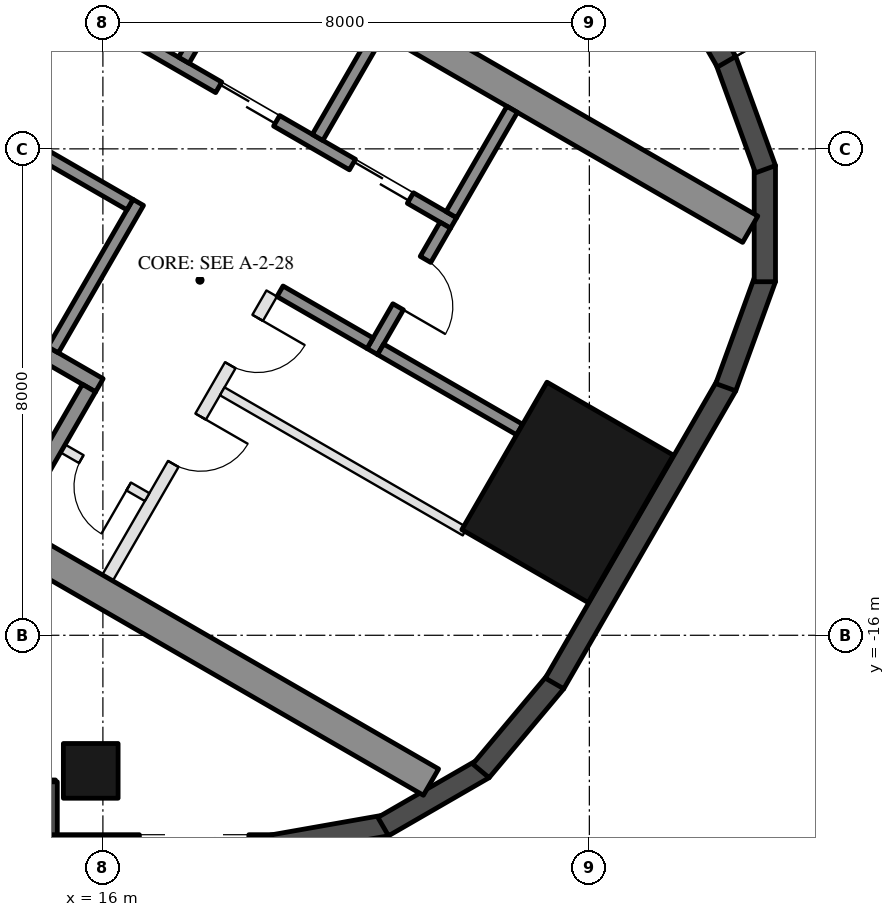
"""IFC4 building model, lengths in metres.
Left out: names, types, materials, properties, quantities, classifications, styles, units other than length and angle.
Written with IfcOpenShell. Run it as: python <this file> out.ifc"""

import sys

from ifc_helpers import new_model, si_unit, direction, frame, frame_2d, origin, origin_2d, place, context, subcontext, project, spatial, rectangle, hollow_rectangle, extrude, element, fill, save


model = new_model("IFC4")
c1 = context("Model", 3, precision=1e-05, world=origin(), true_north=direction((0.0, 1.0)))
c2 = subcontext(c1, "Body", "Model", "MODEL_VIEW")
j1 = project(units=[si_unit("LENGTHUNIT", "METRE"), si_unit("PLANEANGLEUNIT", "RADIAN")], contexts=[c1])
p1 = place(None, origin())
s1 = spatial("IfcSite", under=j1, at=p1, CompositionType="ELEMENT")
p2 = place(p1, origin())
s2 = spatial("IfcBuilding", under=s1, at=p2, CompositionType="ELEMENT")
p3 = place(p2, frame((0.0, 0.0, 124.2)))
s3 = spatial("IfcBuildingStorey", under=s2, at=p3, CompositionType="ELEMENT", Elevation=124.2)
p4 = place(p3, frame((15.8, -18.23, 0.0), z_axis=(0.0, 0.0, 1.0), x_axis=(-1.0, 0.0, 0.0)))
e1 = element("IfcColumn", 1, at=p4, inside=s3, PredefinedType="COLUMN", context=c2, shape_type="SweptSolid", body=[
    extrude(hollow_rectangle(XDim=0.9, YDim=0.9, WallThickness=0.04, at=origin_2d()), origin(), (0.0, 0.0, 1.0), 3.7),
])
p5 = place(p3, frame((23.643, -13.65, 0.0), z_axis=(0.0, 0.0, 1.0), x_axis=(0.5, 0.866025403784, 0.0)))
e2 = element("IfcColumn", 2, at=p5, inside=s3, PredefinedType="COLUMN", context=c2, shape_type="SweptSolid", body=[
    extrude(hollow_rectangle(XDim=2.8, YDim=2.4, WallThickness=0.07, at=origin_2d()), origin(), (0.0, 0.0, 1.0), 3.7),
])
p6 = place(p3, frame((8.48, -18.555, 0.0), z_axis=(0.0, 0.0, 1.0), x_axis=(1.0, 0.0, 0.0)))
e3 = element("IfcWall", 3, at=p6, inside=s3, PredefinedType="SOLIDWALL", context=c2, shape_type="SweptSolid", body=[
    extrude(rectangle(XDim=6.74, YDim=0.35, at=frame_2d((3.37, 0.0))), origin(), (0.0, 0.0, 1.0), 3.55),
])
p7 = place(p6, frame((0.32, 0.0, 0.0)))
e4 = element("IfcOpeningElement", 4, at=p7, cuts=e3, PredefinedType="OPENING", context=c2, shape_type="SweptSolid", body=[
    extrude(rectangle(XDim=2.4, YDim=2.4, at=frame_2d((1.2, 1.2))), frame((0.0, 0.185, 0.0), z_axis=(0.0, -1.0, 0.0), x_axis=(1.0, 0.0, 0.0)), (0.0, 0.0, 1.0), 0.37),
])
p8 = place(p6, frame((3.02, 0.0, 0.3)))
e5 = element("IfcOpeningElement", 5, at=p8, cuts=e3, PredefinedType="OPENING", context=c2, shape_type="SweptSolid", body=[
    extrude(rectangle(XDim=2.9, YDim=2.65, at=frame_2d((1.45, 1.325))), frame((0.0, 0.185, 0.0), z_axis=(0.0, -1.0, 0.0), x_axis=(1.0, 0.0, 0.0)), (0.0, 0.0, 1.0), 0.37),
])
p9 = place(p3, frame((15.075, -18.41, 0.0), z_axis=(0.0, 0.0, 1.0), x_axis=(0.0, -1.0, 0.0)))
e6 = element("IfcWall", 6, at=p9, inside=s3, PredefinedType="SOLIDWALL", context=c2, shape_type="SweptSolid", body=[
    extrude(rectangle(XDim=1.22, YDim=0.35, at=frame_2d((0.61, 0.0))), origin(), (0.0, 0.0, 1.0), 3.55),
])
p10 = place(p3, frame((14.9, -19.455, 0.0), z_axis=(0.0, 0.0, 1.0), x_axis=(1.0, 0.0, 0.0)))
e7 = element("IfcWall", 7, at=p10, inside=s3, PredefinedType="SOLIDWALL", context=c2, shape_type="SweptSolid", body=[
    extrude(rectangle(XDim=3.916, YDim=0.35, at=frame_2d((1.958, 0.0))), origin(), (0.0, 0.0, 1.0), 3.55),
])
p11 = place(p10, frame((1.7, 0.0, 0.3)))
e8 = element("IfcOpeningElement", 8, at=p11, cuts=e7, PredefinedType="OPENING", context=c2, shape_type="SweptSolid", body=[
    extrude(rectangle(XDim=1.8, YDim=2.65, at=frame_2d((0.9, 1.325))), frame((0.0, 0.185, 0.0), z_axis=(0.0, -1.0, 0.0), x_axis=(1.0, 0.0, 0.0)), (0.0, 0.0, 1.0), 0.37),
])
p12 = place(p3, frame((18.785, -19.458, 0.0), z_axis=(0.0, 0.0, 1.0), x_axis=(0.984798995425, 0.173697837091, 0.0)))
e9 = element("IfcWall", 9, at=p12, inside=s3, PredefinedType="SOLIDWALL", context=c2, shape_type="SweptSolid", body=[
    extrude(rectangle(XDim=1.91, YDim=0.35, at=frame_2d((0.955, 0.0))), origin(), (0.0, 0.0, 1.0), 3.55),
])
for number, where, z_axis, x_axis in (
    (10, (20.61, -19.147, 0.0), (0.0, 0.0, 1.0), (0.866, 0.5, 0.0)),
    (11, (22.217, -18.231, 0.0), (0.0, 0.0, 1.0), (0.643, 0.766, 0.0)),
):
    element("IfcWall", number, at=place(p3, frame(where, z_axis=z_axis, x_axis=x_axis)), inside=s3, PredefinedType="SOLIDWALL", context=c2, shape_type="SweptSolid", body=[
        extrude(rectangle(XDim=1.91, YDim=0.35, at=frame_2d((0.955, 0.0))), origin(), (0.0, 0.0, 1.0), 3.55),
    ])
p13 = place(p3, frame((23.427, -16.792, 0.0), z_axis=(0.0, 0.0, 1.0), x_axis=(0.500018773155, 0.866014564827, 0.0)))
e12 = element("IfcWall", 12, at=p13, inside=s3, PredefinedType="SOLIDWALL", context=c2, shape_type="SweptSolid", body=[
    extrude(rectangle(XDim=5.658, YDim=0.35, at=frame_2d((2.829, 0.0))), origin(), (0.0, 0.0, 1.0), 3.55),
])
for number, where, z_axis, x_axis in (
    (13, (26.244, -11.92, 0.0), (0.0, 0.0, 1.0), (0.342, 0.94, 0.0)),
    (14, (26.886, -10.185, 0.0), (0.0, 0.0, 1.0), (0.0, 1.0, 0.0)),
    (15, (26.897, -8.335, 0.0), (0.0, 0.0, 1.0), (-0.342, 0.94, 0.0)),
):
    element("IfcWall", number, at=place(p3, frame(where, z_axis=z_axis, x_axis=x_axis)), inside=s3, PredefinedType="SOLIDWALL", context=c2, shape_type="SweptSolid", body=[
        extrude(rectangle(XDim=1.91, YDim=0.35, at=frame_2d((0.955, 0.0))), origin(), (0.0, 0.0, 1.0), 3.55),
    ])
p14 = place(p3, frame((26.257, -6.567, 0.0), z_axis=(0.0, 0.0, 1.0), x_axis=(-0.500023526245, 0.866011820475, 0.0)))
e16 = element("IfcWall", 16, at=p14, inside=s3, PredefinedType="SOLIDWALL", context=c2, shape_type="SweptSolid", body=[
    extrude(rectangle(XDim=11.816, YDim=0.35, at=frame_2d((5.908, 0.0))), origin(), (0.0, 0.0, 1.0), 3.55),
])
p15 = place(p14, frame((0.38, 0.0, 0.3)))
e17 = element("IfcOpeningElement", 17, at=p15, cuts=e16, PredefinedType="OPENING", context=c2, shape_type="SweptSolid", body=[
    extrude(rectangle(XDim=1.8, YDim=2.65, at=frame_2d((0.9, 1.325))), frame((0.0, 0.185, 0.0), z_axis=(0.0, -1.0, 0.0), x_axis=(1.0, 0.0, 0.0)), (0.0, 0.0, 1.0), 0.37),
])
p16 = place(p14, frame((7.716, 0.0, 0.0)))
e18 = element("IfcOpeningElement", 18, at=p16, cuts=e16, PredefinedType="OPENING", context=c2, shape_type="SweptSolid", body=[
    extrude(rectangle(XDim=2.4, YDim=2.4, at=frame_2d((1.2, 1.2))), frame((0.0, 0.185, 0.0), z_axis=(0.0, -1.0, 0.0), x_axis=(1.0, 0.0, 0.0)), (0.0, 0.0, 1.0), 0.37),
])
p17 = place(p14, frame((3.816, 0.0, 0.3)))
e19 = element("IfcOpeningElement", 19, at=p17, cuts=e16, PredefinedType="OPENING", context=c2, shape_type="SweptSolid", body=[
    extrude(rectangle(XDim=1.6, YDim=2.65, at=frame_2d((0.8, 1.325))), frame((0.0, 0.185, 0.0), z_axis=(0.0, -1.0, 0.0), x_axis=(1.0, 0.0, 0.0)), (0.0, 0.0, 1.0), 0.37),
])
p18 = place(p14, frame((5.716, 0.0, 0.3)))
e20 = element("IfcOpeningElement", 20, at=p18, cuts=e16, PredefinedType="OPENING", context=c2, shape_type="SweptSolid", body=[
    extrude(rectangle(XDim=1.6, YDim=2.65, at=frame_2d((0.8, 1.325))), frame((0.0, 0.185, 0.0), z_axis=(0.0, -1.0, 0.0), x_axis=(1.0, 0.0, 0.0)), (0.0, 0.0, 1.0), 0.37),
])
for number, where, z_axis, x_axis in (
    (21, (8.547, -10.997, 0.0), (0.0, 0.0, 1.0), (0.866, -0.5, 0.0)),
    (22, (13.797, -1.903, 0.0), (0.0, 0.0, 1.0), (0.866, -0.5, 0.0)),
):
    element("IfcWall", number, at=place(p3, frame(where, z_axis=z_axis, x_axis=x_axis)), inside=s3, PredefinedType="SHEAR", context=c2, shape_type="SweptSolid", body=[
        extrude(rectangle(XDim=14.837, YDim=0.5, at=frame_2d((7.418, 0.0))), origin(), (0.0, 0.0, 1.0), 3.5),
    ])
p19 = place(p3, frame((10.356, -8.664, 0.0), z_axis=(0.0, 0.0, 1.0), x_axis=(0.866028629588, -0.499994412703, 0.0)))
e23 = element("IfcWall", 23, at=p19, inside=s3, PredefinedType="SHEAR", context=c2, shape_type="SweptSolid", body=[
    extrude(rectangle(XDim=6.45, YDim=0.25, at=frame_2d((3.225, 0.0))), origin(), (0.0, 0.0, 1.0), 3.5),
])
p20 = place(p19, frame((0.3, 0.0, 0.0)))
e24 = element("IfcOpeningElement", 24, at=p20, cuts=e23, PredefinedType="OPENING", context=c2, shape_type="SweptSolid", body=[
    extrude(rectangle(XDim=1.0, YDim=2.1, at=frame_2d((0.5, 1.05))), frame((0.0, 0.135, 0.0), z_axis=(0.0, -1.0, 0.0), x_axis=(1.0, 0.0, 0.0)), (0.0, 0.0, 1.0), 0.27),
])
p21 = place(p3, frame((14.496, -14.143, 0.0), z_axis=(0.0, 0.0, 1.0), x_axis=(0.500062241894, 0.865989465428, 0.0)))
e25 = element("IfcWall", 25, at=p21, inside=s3, PredefinedType="SHEAR", context=c2, shape_type="SweptSolid", body=[
    extrude(rectangle(XDim=2.55, YDim=0.25, at=frame_2d((1.275, 0.0))), origin(), (0.0, 0.0, 1.0), 3.5),
])
p22 = place(p3, frame((15.181, -11.305, 0.0), z_axis=(0.0, 0.0, 1.0), x_axis=(0.49994636267, 0.866056369097, 0.0)))
e26 = element("IfcWall", 26, at=p22, inside=s3, PredefinedType="SHEAR", context=c2, shape_type="SweptSolid", body=[
    extrude(rectangle(XDim=2.8, YDim=0.2, at=frame_2d((1.4, 0.0))), origin(), (0.0, 0.0, 1.0), 3.5),
])
p23 = place(p3, frame((14.02, -7.517, 0.0), z_axis=(0.0, 0.0, 1.0), x_axis=(0.866034573852, -0.49998411664, 0.0)))
e27 = element("IfcWall", 27, at=p23, inside=s3, PredefinedType="SHEAR", context=c2, shape_type="SweptSolid", body=[
    extrude(rectangle(XDim=2.8, YDim=0.2, at=frame_2d((1.4, 0.0))), origin(), (0.0, 0.0, 1.0), 3.5),
])
p24 = place(p3, frame((12.968, -4.138, 0.0), z_axis=(0.0, 0.0, 1.0), x_axis=(0.866028328073, -0.49999493495, 0.0)))
e28 = element("IfcWall", 28, at=p24, inside=s3, PredefinedType="SHEAR", context=c2, shape_type="SweptSolid", body=[
    extrude(rectangle(XDim=10.16, YDim=0.2, at=frame_2d((5.08, 0.0))), origin(), (0.0, 0.0, 1.0), 3.5),
])
p25 = place(p24, frame((0.62, 0.0, 0.0)))
e29 = element("IfcOpeningElement", 29, at=p25, cuts=e28, PredefinedType="OPENING", context=c2, shape_type="SweptSolid", body=[
    extrude(rectangle(XDim=1.1, YDim=2.1, at=frame_2d((0.55, 1.05))), frame((0.0, 0.11, 0.0), z_axis=(0.0, -1.0, 0.0), x_axis=(1.0, 0.0, 0.0)), (0.0, 0.0, 1.0), 0.22),
])
p26 = place(p24, frame((3.16, 0.0, 0.0)))
e30 = element("IfcOpeningElement", 30, at=p26, cuts=e28, PredefinedType="OPENING", context=c2, shape_type="SweptSolid", body=[
    extrude(rectangle(XDim=1.1, YDim=2.1, at=frame_2d((0.55, 1.05))), frame((0.0, 0.11, 0.0), z_axis=(0.0, -1.0, 0.0), x_axis=(1.0, 0.0, 0.0)), (0.0, 0.0, 1.0), 0.22),
])
p27 = place(p24, frame((5.7, 0.0, 0.0)))
e31 = element("IfcOpeningElement", 31, at=p27, cuts=e28, PredefinedType="OPENING", context=c2, shape_type="SweptSolid", body=[
    extrude(rectangle(XDim=1.1, YDim=2.1, at=frame_2d((0.55, 1.05))), frame((0.0, 0.11, 0.0), z_axis=(0.0, -1.0, 0.0), x_axis=(1.0, 0.0, 0.0)), (0.0, 0.0, 1.0), 0.22),
])
p28 = place(p24, frame((8.24, 0.0, 0.0)))
e32 = element("IfcOpeningElement", 32, at=p28, cuts=e28, PredefinedType="OPENING", context=c2, shape_type="SweptSolid", body=[
    extrude(rectangle(XDim=1.1, YDim=2.1, at=frame_2d((0.55, 1.05))), frame((0.0, 0.11, 0.0), z_axis=(0.0, -1.0, 0.0), x_axis=(1.0, 0.0, 0.0)), (0.0, 0.0, 1.0), 0.22),
])
p29 = place(p3, frame((20.43, -11.333, 0.0), z_axis=(0.0, 0.0, 1.0), x_axis=(0.500001309137, 0.866024647952, 0.0)))
e33 = element("IfcWall", 33, at=p29, inside=s3, PredefinedType="SHEAR", context=c2, shape_type="SweptSolid", body=[
    extrude(rectangle(XDim=2.4, YDim=0.2, at=frame_2d((1.2, 0.0))), origin(), (0.0, 0.0, 1.0), 3.5),
])
p30 = place(p29, frame((0.85, 0.0, 0.0)))
e34 = element("IfcOpeningElement", 34, at=p30, cuts=e33, PredefinedType="OPENING", context=c2, shape_type="SweptSolid", body=[
    extrude(rectangle(XDim=0.9, YDim=2.1, at=frame_2d((0.45, 1.05))), frame((0.0, 0.11, 0.0), z_axis=(0.0, -1.0, 0.0), x_axis=(1.0, 0.0, 0.0)), (0.0, 0.0, 1.0), 0.22),
])
p31 = place(p3, frame((18.913, -10.342, 0.0), z_axis=(0.0, 0.0, 1.0), x_axis=(0.866038183914, -0.499977863513, 0.0)))
e35 = element("IfcWall", 35, at=p31, inside=s3, PredefinedType="SHEAR", context=c2, shape_type="SweptSolid", body=[
    extrude(rectangle(XDim=1.71, YDim=0.2, at=frame_2d((0.855, 0.0))), origin(), (0.0, 0.0, 1.0), 3.5),
])
for number, where, z_axis, x_axis in (
    (36, (17.331, -6.542, 0.0), (0.0, 0.0, 1.0), (0.5, 0.866, 0.0)),
    (37, (19.531, -7.812, 0.0), (0.0, 0.0, 1.0), (0.5, 0.866, 0.0)),
    (38, (21.73, -9.082, 0.0), (0.0, 0.0, 1.0), (0.5, 0.866, 0.0)),
):
    element("IfcWall", number, at=place(p3, frame(where, z_axis=z_axis, x_axis=x_axis)), inside=s3, PredefinedType="SHEAR", context=c2, shape_type="SweptSolid", body=[
        extrude(rectangle(XDim=2.0, YDim=0.2, at=frame_2d((1.0, 0.0))), origin(), (0.0, 0.0, 1.0), 3.5),
    ])
p32 = place(p3, frame((20.567, -11.297, 0.0), z_axis=(0.0, 0.0, 1.0), x_axis=(0.866060851709, -0.499938597367, 0.0)))
e39 = element("IfcWall", 39, at=p32, inside=s3, PredefinedType="SHEAR", context=c2, shape_type="SweptSolid", body=[
    extrude(rectangle(XDim=2.64, YDim=0.2, at=frame_2d((1.32, 0.0))), origin(), (0.0, 0.0, 1.0), 3.5),
])
p33 = place(p3, frame((16.076, -15.055, 0.0), z_axis=(0.0, 0.0, 1.0), x_axis=(0.499995103361, 0.866028230842, 0.0)))
e40 = element("IfcWall", 40, at=p33, inside=s3, PredefinedType="PARTITIONING", context=c2, shape_type="SweptSolid", body=[
    extrude(rectangle(XDim=5.4, YDim=0.2, at=frame_2d((2.7, 0.0))), origin(), (0.0, 0.0, 1.0), 3.5),
])
p34 = place(p33, frame((2.163, 0.0, 0.0)))
e41 = element("IfcOpeningElement", 41, at=p34, cuts=e40, PredefinedType="OPENING", context=c2, shape_type="SweptSolid", body=[
    extrude(rectangle(XDim=0.9, YDim=2.1, at=frame_2d((0.45, 1.05))), frame((0.0, 0.11, 0.0), z_axis=(0.0, -1.0, 0.0), x_axis=(1.0, 0.0, 0.0)), (0.0, 0.0, 1.0), 0.22),
])
p35 = place(p33, frame((4.038, 0.0, 0.0)))
e42 = element("IfcOpeningElement", 42, at=p35, cuts=e40, PredefinedType="OPENING", context=c2, shape_type="SweptSolid", body=[
    extrude(rectangle(XDim=0.9, YDim=2.1, at=frame_2d((0.45, 1.05))), frame((0.0, 0.11, 0.0), z_axis=(0.0, -1.0, 0.0), x_axis=(1.0, 0.0, 0.0)), (0.0, 0.0, 1.0), 0.22),
])
p36 = place(p3, frame((15.342, -12.928, 0.0), z_axis=(0.0, 0.0, 1.0), x_axis=(0.865989903783, -0.500061482766, 0.0)))
e43 = element("IfcWall", 43, at=p36, inside=s3, PredefinedType="PARTITIONING", context=c2, shape_type="SweptSolid", body=[
    extrude(rectangle(XDim=1.6, YDim=0.15, at=frame_2d((0.8, 0.0))), origin(), (0.0, 0.0, 1.0), 3.5),
])
p37 = place(p36, frame((0.35, 0.0, 0.0)))
e44 = element("IfcOpeningElement", 44, at=p37, cuts=e43, PredefinedType="OPENING", context=c2, shape_type="SweptSolid", body=[
    extrude(rectangle(XDim=0.9, YDim=2.1, at=frame_2d((0.45, 1.05))), frame((0.0, 0.085, 0.0), z_axis=(0.0, -1.0, 0.0), x_axis=(1.0, 0.0, 0.0)), (0.0, 0.0, 1.0), 0.17),
])
p38 = place(p3, frame((17.963, -11.987, 0.0), z_axis=(0.0, 0.0, 1.0), x_axis=(0.865998608524, -0.500046407882, 0.0)))
e45 = element("IfcWall", 45, at=p38, inside=s3, PredefinedType="PARTITIONING", context=c2, shape_type="SweptSolid", body=[
    extrude(rectangle(XDim=4.61, YDim=0.15, at=frame_2d((2.305, 0.0))), origin(), (0.0, 0.0, 1.0), 3.5),
])
p39 = place(p37, frame((0.9, 0.0, 0.0), z_axis=(0.0, 0.0, 1.0), x_axis=(-1.0, 0.0, 0.0)))
e46 = element("IfcDoor", 46, at=p39, inside=s3, OperationType="SINGLE_SWING_LEFT", PredefinedType="DOOR", context=c2, shape_type="SweptSolid", body=[
    extrude(rectangle(XDim=0.9, YDim=2.1, at=frame_2d((0.45, 1.05))), frame((0.0, 0.025, 0.0), z_axis=(0.0, -1.0, 0.0), x_axis=(1.0, 0.0, 0.0)), (0.0, 0.0, 1.0), 0.05),
])
fill(e44, e46)
p40 = place(p27, origin())
e47 = element("IfcDoor", 47, at=p40, inside=s3, OperationType="DOUBLE_DOOR_SLIDING", PredefinedType="DOOR", context=c2, shape_type="SweptSolid", body=[
    extrude(rectangle(XDim=1.1, YDim=2.1, at=frame_2d((0.55, 1.05))), frame((0.0, 0.025, 0.0), z_axis=(0.0, -1.0, 0.0), x_axis=(1.0, 0.0, 0.0)), (0.0, 0.0, 1.0), 0.05),
])
fill(e31, e47)
p41 = place(p28, origin())
e48 = element("IfcDoor", 48, at=p41, inside=s3, OperationType="DOUBLE_DOOR_SLIDING", PredefinedType="DOOR", context=c2, shape_type="SweptSolid", body=[
    extrude(rectangle(XDim=1.1, YDim=2.1, at=frame_2d((0.55, 1.05))), frame((0.0, 0.025, 0.0), z_axis=(0.0, -1.0, 0.0), x_axis=(1.0, 0.0, 0.0)), (0.0, 0.0, 1.0), 0.05),
])
fill(e32, e48)
p42 = place(p30, frame((0.9, 0.0, 0.0), z_axis=(0.0, 0.0, 1.0), x_axis=(-1.0, 0.0, 0.0)))
e49 = element("IfcDoor", 49, at=p42, inside=s3, OperationType="SINGLE_SWING_RIGHT", PredefinedType="DOOR", context=c2, shape_type="SweptSolid", body=[
    extrude(rectangle(XDim=0.9, YDim=2.1, at=frame_2d((0.45, 1.05))), frame((0.0, 0.025, 0.0), z_axis=(0.0, -1.0, 0.0), x_axis=(1.0, 0.0, 0.0)), (0.0, 0.0, 1.0), 0.05),
])
fill(e34, e49)
p43 = place(p34, frame((0.9, 0.0, 0.0), z_axis=(0.0, 0.0, 1.0), x_axis=(-1.0, 0.0, 0.0)))
e50 = element("IfcDoor", 50, at=p43, inside=s3, OperationType="SINGLE_SWING_LEFT", PredefinedType="DOOR", context=c2, shape_type="SweptSolid", body=[
    extrude(rectangle(XDim=0.9, YDim=2.1, at=frame_2d((0.45, 1.05))), frame((0.0, 0.025, 0.0), z_axis=(0.0, -1.0, 0.0), x_axis=(1.0, 0.0, 0.0)), (0.0, 0.0, 1.0), 0.05),
])
fill(e41, e50)
p44 = place(p35, frame((0.9, 0.0, 0.0), z_axis=(0.0, 0.0, 1.0), x_axis=(-1.0, 0.0, 0.0)))
e51 = element("IfcDoor", 51, at=p44, inside=s3, OperationType="SINGLE_SWING_LEFT", PredefinedType="DOOR", context=c2, shape_type="SweptSolid", body=[
    extrude(rectangle(XDim=0.9, YDim=2.1, at=frame_2d((0.45, 1.05))), frame((0.0, 0.025, 0.0), z_axis=(0.0, -1.0, 0.0), x_axis=(1.0, 0.0, 0.0)), (0.0, 0.0, 1.0), 0.05),
])
fill(e42, e51)
save(model, sys.argv[1])
